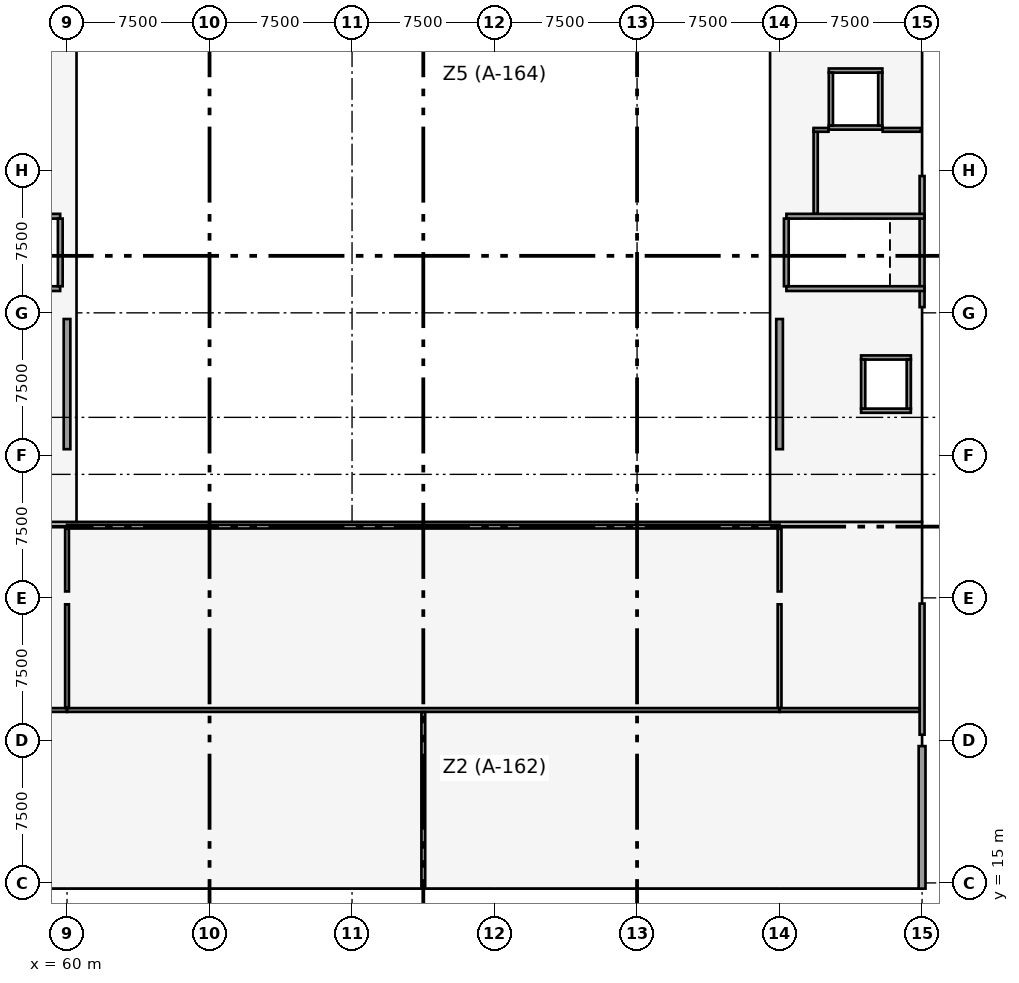
"""IFC4 building model, lengths in metres.
Left out: names, types, materials, properties, quantities, classifications, styles, units other than length and angle.
Written with IfcOpenShell. Run it as: python <this file> out.ifc"""

import sys

from ifc_helpers import new_model, si_unit, direction, frame, frame_2d, origin, origin_2d, place, context, subcontext, project, spatial, rectangle, extrude, element, fill, save


model = new_model("IFC4")
c1 = context("Model", 3, precision=1e-05, world=origin(), true_north=direction((0.0, 1.0)))
c2 = subcontext(c1, "Body", "Model", "MODEL_VIEW")
j1 = project(units=[si_unit("LENGTHUNIT", "METRE"), si_unit("PLANEANGLEUNIT", "RADIAN")], contexts=[c1])
p1 = place(None, origin())
s1 = spatial("IfcSite", under=j1, at=p1, CompositionType="ELEMENT")
p2 = place(p1, origin())
s2 = spatial("IfcBuilding", under=s1, at=p2, CompositionType="ELEMENT")
p3 = place(p2, frame((0.0, 0.0, 21.0)))
s3 = spatial("IfcBuildingStorey", under=s2, at=p3, CompositionType="ELEMENT", Elevation=21.0)
for number, where, z_axis, x_axis in (
    (1, (60.0, 22.5, 0.0), (0.0, 0.0, 1.0), (1.0, 0.0, 0.0)),
    (2, (60.0, 30.0, 0.0), (0.0, 0.0, 1.0), (1.0, 0.0, 0.0)),
    (3, (60.0, 37.5, 0.0), (0.0, 0.0, 1.0), (1.0, 0.0, 0.0)),
    (4, (60.0, 45.0, 0.0), (0.0, 0.0, 1.0), (1.0, 0.0, 0.0)),
    (5, (60.0, 52.5, 0.0), (0.0, 0.0, 1.0), (1.0, 0.0, 0.0)),
    (6, (75.0, 22.5, 0.0), (0.0, 0.0, 1.0), (1.0, 0.0, 0.0)),
    (7, (75.0, 30.0, 0.0), (0.0, 0.0, 1.0), (1.0, 0.0, 0.0)),
    (8, (90.0, 22.5, 0.0), (0.0, 0.0, 1.0), (1.0, 0.0, 0.0)),
    (9, (90.0, 30.0, 0.0), (0.0, 0.0, 1.0), (1.0, 0.0, 0.0)),
    (10, (97.5, 22.5, 0.0), (0.0, 0.0, 1.0), (1.0, 0.0, 0.0)),
    (11, (97.5, 30.0, 0.0), (0.0, 0.0, 1.0), (1.0, 0.0, 0.0)),
    (12, (97.5, 37.5, 0.0), (0.0, 0.0, 1.0), (1.0, 0.0, 0.0)),
    (13, (97.5, 45.0, 0.0), (0.0, 0.0, 1.0), (1.0, 0.0, 0.0)),
    (14, (97.5, 52.5, 0.0), (0.0, 0.0, 1.0), (1.0, 0.0, 0.0)),
):
    element("IfcColumn", number, at=place(p3, frame(where, z_axis=z_axis, x_axis=x_axis)), inside=s3, PredefinedType="COLUMN", context=c2, shape_type="SweptSolid", body=[
        extrude(rectangle(XDim=0.65, YDim=0.65, at=origin_2d()), origin(), (0.0, 0.0, 1.0), 4.2),
    ])
p4 = place(p3, frame((105.0, 22.5, 0.0), z_axis=(0.0, 0.0, 1.0), x_axis=(1.0, 0.0, 0.0)))
e15 = element("IfcColumn", 15, at=p4, inside=s3, PredefinedType="COLUMN", context=c2, shape_type="SweptSolid", body=[
    extrude(rectangle(XDim=0.6, YDim=1.1, at=origin_2d()), origin(), (0.0, 0.0, 1.0), 4.2),
])
for number, where, z_axis, x_axis in (
    (16, (105.0, 30.0, 0.0), (0.0, 0.0, 1.0), (1.0, 0.0, 0.0)),
    (17, (105.0, 37.5, 0.0), (0.0, 0.0, 1.0), (1.0, 0.0, 0.0)),
    (18, (105.0, 45.0, 0.0), (0.0, 0.0, 1.0), (1.0, 0.0, 0.0)),
    (19, (105.0, 52.5, 0.0), (0.0, 0.0, 1.0), (1.0, 0.0, 0.0)),
):
    element("IfcColumn", number, at=place(p3, frame(where, z_axis=z_axis, x_axis=x_axis)), inside=s3, PredefinedType="COLUMN", context=c2, shape_type="SweptSolid", body=[
        extrude(rectangle(XDim=0.65, YDim=0.65, at=origin_2d()), origin(), (0.0, 0.0, 1.0), 4.2),
    ])
for number, where, z_axis, x_axis in (
    (20, (60.0, 37.825, 0.0), (0.0, 0.0, 1.0), (0.0, 1.0, 0.0)),
    (21, (97.5, 37.825, 0.0), (0.0, 0.0, 1.0), (0.0, 1.0, 0.0)),
):
    element("IfcWall", number, at=place(p3, frame(where, z_axis=z_axis, x_axis=x_axis)), inside=s3, PredefinedType="SHEAR", context=c2, shape_type="SweptSolid", body=[
        extrude(rectangle(XDim=6.85, YDim=0.35, at=frame_2d((3.425, 0.0))), origin(), (0.0, 0.0, 1.0), 2.72),
    ])
p5 = place(p3, frame((105.0, 14.7, 0.0), z_axis=(0.0, 0.0, 1.0), x_axis=(0.0, 1.0, 0.0)))
e22 = element("IfcWall", 22, at=p5, inside=s3, PredefinedType="SOLIDWALL", context=c2, shape_type="SweptSolid", body=[
    extrude(rectangle(XDim=7.5, YDim=0.36, at=frame_2d((3.75, 0.0))), origin(), (0.0, 0.0, 1.0), 3.32),
])
p6 = place(p3, frame((105.0, 22.8, 0.0), z_axis=(0.0, 0.0, 1.0), x_axis=(0.0, 1.0, 0.0)))
e23 = element("IfcWall", 23, at=p6, inside=s3, PredefinedType="SOLIDWALL", context=c2, shape_type="SweptSolid", body=[
    extrude(rectangle(XDim=6.9, YDim=0.26, at=frame_2d((3.45, 0.0))), origin(), (0.0, 0.0, 1.0), 3.04),
])
p7 = place(p3, frame((105.0, 45.3, 0.0), z_axis=(0.0, 0.0, 1.0), x_axis=(0.0, 1.0, 0.0)))
e24 = element("IfcWall", 24, at=p7, inside=s3, PredefinedType="SOLIDWALL", context=c2, shape_type="SweptSolid", body=[
    extrude(rectangle(XDim=6.9, YDim=0.26, at=frame_2d((3.45, 0.0))), origin(), (0.0, 0.0, 1.0), 2.94),
])
p8 = place(p3, frame((52.38, 46.275, 0.0), z_axis=(0.0, 0.0, 1.0), x_axis=(1.0, 0.0, 0.0)))
e25 = element("IfcWall", 25, at=p8, inside=s3, PredefinedType="SOLIDWALL", context=c2, shape_type="SweptSolid", body=[
    extrude(rectangle(XDim=7.26, YDim=0.25, at=frame_2d((3.63, 0.0))), origin(), (0.0, 0.0, 1.0), 3.92),
])
p9 = place(p8, frame((0.62, 0.0, 0.0)))
e26 = element("IfcOpeningElement", 26, at=p9, cuts=e25, PredefinedType="OPENING", context=c2, shape_type="SweptSolid", body=[
    extrude(rectangle(XDim=1.1, YDim=2.15, at=frame_2d((0.55, 1.075))), frame((0.0, 0.135, 0.0), z_axis=(0.0, -1.0, 0.0), x_axis=(1.0, 0.0, 0.0)), (0.0, 0.0, 1.0), 0.27),
])
p10 = place(p3, frame((52.38, 50.085, 0.0), z_axis=(0.0, 0.0, 1.0), x_axis=(1.0, 0.0, 0.0)))
e27 = element("IfcWall", 27, at=p10, inside=s3, PredefinedType="SOLIDWALL", context=c2, shape_type="SweptSolid", body=[
    extrude(rectangle(XDim=7.26, YDim=0.25, at=frame_2d((3.63, 0.0))), origin(), (0.0, 0.0, 1.0), 3.92),
])
p11 = place(p10, frame((0.62, 0.0, 0.0)))
e28 = element("IfcOpeningElement", 28, at=p11, cuts=e27, PredefinedType="OPENING", context=c2, shape_type="SweptSolid", body=[
    extrude(rectangle(XDim=1.1, YDim=2.15, at=frame_2d((0.55, 1.075))), frame((0.0, 0.135, 0.0), z_axis=(0.0, -1.0, 0.0), x_axis=(1.0, 0.0, 0.0)), (0.0, 0.0, 1.0), 0.27),
])
p12 = place(p3, frame((59.645, 46.4, 0.0), z_axis=(0.0, 0.0, 1.0), x_axis=(0.0, 1.0, 0.0)))
e29 = element("IfcWall", 29, at=p12, inside=s3, PredefinedType="SOLIDWALL", context=c2, shape_type="SweptSolid", body=[
    extrude(rectangle(XDim=3.56, YDim=0.25, at=frame_2d((1.78, 0.0))), origin(), (0.0, 0.0, 1.0), 3.92),
])
p13 = place(p3, frame((97.86, 46.275, 0.0), z_axis=(0.0, 0.0, 1.0), x_axis=(1.0, 0.0, 0.0)))
e30 = element("IfcWall", 30, at=p13, inside=s3, PredefinedType="SOLIDWALL", context=c2, shape_type="SweptSolid", body=[
    extrude(rectangle(XDim=7.26, YDim=0.25, at=frame_2d((3.63, 0.0))), origin(), (0.0, 0.0, 1.0), 3.92),
])
p14 = place(p13, frame((5.54, 0.0, 0.0)))
e31 = element("IfcOpeningElement", 31, at=p14, cuts=e30, PredefinedType="OPENING", context=c2, shape_type="SweptSolid", body=[
    extrude(rectangle(XDim=1.1, YDim=2.15, at=frame_2d((0.55, 1.075))), frame((0.0, 0.135, 0.0), z_axis=(0.0, -1.0, 0.0), x_axis=(1.0, 0.0, 0.0)), (0.0, 0.0, 1.0), 0.27),
])
p15 = place(p3, frame((97.86, 50.085, 0.0), z_axis=(0.0, 0.0, 1.0), x_axis=(1.0, 0.0, 0.0)))
e32 = element("IfcWall", 32, at=p15, inside=s3, PredefinedType="SOLIDWALL", context=c2, shape_type="SweptSolid", body=[
    extrude(rectangle(XDim=7.26, YDim=0.25, at=frame_2d((3.63, 0.0))), origin(), (0.0, 0.0, 1.0), 3.92),
])
p16 = place(p15, frame((5.54, 0.0, 0.0)))
e33 = element("IfcOpeningElement", 33, at=p16, cuts=e32, PredefinedType="OPENING", context=c2, shape_type="SweptSolid", body=[
    extrude(rectangle(XDim=1.1, YDim=2.15, at=frame_2d((0.55, 1.075))), frame((0.0, 0.135, 0.0), z_axis=(0.0, -1.0, 0.0), x_axis=(1.0, 0.0, 0.0)), (0.0, 0.0, 1.0), 0.27),
])
p17 = place(p3, frame((97.855, 46.4, 0.0), z_axis=(0.0, 0.0, 1.0), x_axis=(0.0, 1.0, 0.0)))
e34 = element("IfcWall", 34, at=p17, inside=s3, PredefinedType="SOLIDWALL", context=c2, shape_type="SweptSolid", body=[
    extrude(rectangle(XDim=3.56, YDim=0.25, at=frame_2d((1.78, 0.0))), origin(), (0.0, 0.0, 1.0), 3.92),
])
for number, where, z_axis, x_axis in (
    (35, (101.79, 39.85, 0.0), (0.0, 0.0, 1.0), (1.0, 0.0, 0.0)),
    (36, (101.79, 42.65, 0.0), (0.0, 0.0, 1.0), (1.0, 0.0, 0.0)),
):
    element("IfcWall", number, at=place(p3, frame(where, z_axis=z_axis, x_axis=x_axis)), inside=s3, PredefinedType="SOLIDWALL", context=c2, shape_type="SweptSolid", body=[
        extrude(rectangle(XDim=2.62, YDim=0.22, at=frame_2d((1.31, 0.0))), origin(), (0.0, 0.0, 1.0), 3.92),
    ])
p18 = place(p3, frame((101.9, 39.96, 0.0), z_axis=(0.0, 0.0, 1.0), x_axis=(0.0, 1.0, 0.0)))
e37 = element("IfcWall", 37, at=p18, inside=s3, PredefinedType="SOLIDWALL", context=c2, shape_type="SweptSolid", body=[
    extrude(rectangle(XDim=2.58, YDim=0.22, at=frame_2d((1.29, 0.0))), origin(), (0.0, 0.0, 1.0), 3.92),
])
p19 = place(p18, frame((0.79, 0.0, 0.0)))
e38 = element("IfcOpeningElement", 38, at=p19, cuts=e37, PredefinedType="OPENING", context=c2, shape_type="SweptSolid", body=[
    extrude(rectangle(XDim=1.0, YDim=2.15, at=frame_2d((0.5, 1.075))), frame((0.0, 0.12, 0.0), z_axis=(0.0, -1.0, 0.0), x_axis=(1.0, 0.0, 0.0)), (0.0, 0.0, 1.0), 0.24),
])
p20 = place(p3, frame((104.3, 39.96, 0.0), z_axis=(0.0, 0.0, 1.0), x_axis=(0.0, 1.0, 0.0)))
e39 = element("IfcWall", 39, at=p20, inside=s3, PredefinedType="SOLIDWALL", context=c2, shape_type="SweptSolid", body=[
    extrude(rectangle(XDim=2.58, YDim=0.22, at=frame_2d((1.29, 0.0))), origin(), (0.0, 0.0, 1.0), 3.92),
])
p21 = place(p3, frame((100.09, 54.75, 0.0), z_axis=(0.0, 0.0, 1.0), x_axis=(1.0, 0.0, 0.0)))
e40 = element("IfcWall", 40, at=p21, inside=s3, PredefinedType="SOLIDWALL", context=c2, shape_type="SweptSolid", body=[
    extrude(rectangle(XDim=2.82, YDim=0.22, at=frame_2d((1.41, 0.0))), origin(), (0.0, 0.0, 1.0), 3.92),
])
p22 = place(p21, frame((0.86, 0.0, 0.0)))
e41 = element("IfcOpeningElement", 41, at=p22, cuts=e40, PredefinedType="OPENING", context=c2, shape_type="SweptSolid", body=[
    extrude(rectangle(XDim=1.1, YDim=2.15, at=frame_2d((0.55, 1.075))), frame((0.0, 0.12, 0.0), z_axis=(0.0, -1.0, 0.0), x_axis=(1.0, 0.0, 0.0)), (0.0, 0.0, 1.0), 0.24),
])
p23 = place(p3, frame((100.09, 57.75, 0.0), z_axis=(0.0, 0.0, 1.0), x_axis=(1.0, 0.0, 0.0)))
e42 = element("IfcWall", 42, at=p23, inside=s3, PredefinedType="SOLIDWALL", context=c2, shape_type="SweptSolid", body=[
    extrude(rectangle(XDim=2.82, YDim=0.22, at=frame_2d((1.41, 0.0))), origin(), (0.0, 0.0, 1.0), 3.92),
])
for number, where, z_axis, x_axis in (
    (43, (100.2, 54.86, 0.0), (0.0, 0.0, 1.0), (0.0, 1.0, 0.0)),
    (44, (102.8, 54.86, 0.0), (0.0, 0.0, 1.0), (0.0, 1.0, 0.0)),
):
    element("IfcWall", number, at=place(p3, frame(where, z_axis=z_axis, x_axis=x_axis)), inside=s3, PredefinedType="SOLIDWALL", context=c2, shape_type="SweptSolid", body=[
        extrude(rectangle(XDim=2.78, YDim=0.22, at=frame_2d((1.39, 0.0))), origin(), (0.0, 0.0, 1.0), 3.92),
    ])
p24 = place(p3, frame((99.4, 50.22, 0.0), z_axis=(0.0, 0.0, 1.0), x_axis=(0.0, 1.0, 0.0)))
e45 = element("IfcWall", 45, at=p24, inside=s3, PredefinedType="SOLIDWALL", context=c2, shape_type="SweptSolid", body=[
    extrude(rectangle(XDim=4.41, YDim=0.22, at=frame_2d((2.205, 0.0))), origin(), (0.0, 0.0, 1.0), 3.92),
])
p25 = place(p24, frame((0.45, 0.0, 0.0)))
e46 = element("IfcOpeningElement", 46, at=p25, cuts=e45, PredefinedType="OPENING", context=c2, shape_type="SweptSolid", body=[
    extrude(rectangle(XDim=1.1, YDim=2.15, at=frame_2d((0.55, 1.075))), frame((0.0, 0.12, 0.0), z_axis=(0.0, -1.0, 0.0), x_axis=(1.0, 0.0, 0.0)), (0.0, 0.0, 1.0), 0.24),
])
p26 = place(p3, frame((99.29, 54.63, 0.0), z_axis=(0.0, 0.0, 1.0), x_axis=(1.0, 0.0, 0.0)))
e47 = element("IfcWall", 47, at=p26, inside=s3, PredefinedType="PARTITIONING", context=c2, shape_type="SweptSolid", body=[
    extrude(rectangle(XDim=0.785, YDim=0.2, at=frame_2d((0.393, 0.0))), origin(), (0.0, 0.0, 1.0), 3.9),
])
p27 = place(p3, frame((102.925, 54.63, 0.0), z_axis=(0.0, 0.0, 1.0), x_axis=(1.0, 0.0, 0.0)))
e48 = element("IfcWall", 48, at=p27, inside=s3, PredefinedType="PARTITIONING", context=c2, shape_type="SweptSolid", body=[
    extrude(rectangle(XDim=2.015, YDim=0.2, at=frame_2d((1.007, 0.0))), origin(), (0.0, 0.0, 1.0), 3.48),
])
p28 = place(p3, frame((52.644, 24.1, 0.0), z_axis=(0.0, 0.0, 1.0), x_axis=(1.0, 0.0, 0.0)))
e49 = element("IfcWall", 49, at=p28, inside=s3, PredefinedType="PARTITIONING", context=c2, shape_type="SweptSolid", body=[
    extrude(rectangle(XDim=7.356, YDim=0.2, at=frame_2d((3.678, 0.0))), origin(), (0.0, 0.0, 1.0), 2.69),
])
p29 = place(p28, frame((3.006, 0.0, 0.0)))
e50 = element("IfcOpeningElement", 50, at=p29, cuts=e49, PredefinedType="OPENING", context=c2, shape_type="SweptSolid", body=[
    extrude(rectangle(XDim=1.2, YDim=2.15, at=frame_2d((0.6, 1.075))), frame((0.0, 0.11, 0.0), z_axis=(0.0, -1.0, 0.0), x_axis=(1.0, 0.0, 0.0)), (0.0, 0.0, 1.0), 0.22),
])
p30 = place(p3, frame((97.5, 24.1, 0.0), z_axis=(0.0, 0.0, 1.0), x_axis=(1.0, 0.0, 0.0)))
e51 = element("IfcWall", 51, at=p30, inside=s3, PredefinedType="PARTITIONING", context=c2, shape_type="SweptSolid", body=[
    extrude(rectangle(XDim=7.356, YDim=0.2, at=frame_2d((3.678, 0.0))), origin(), (0.0, 0.0, 1.0), 2.69),
])
p31 = place(p30, frame((3.15, 0.0, 0.0)))
e52 = element("IfcOpeningElement", 52, at=p31, cuts=e51, PredefinedType="OPENING", context=c2, shape_type="SweptSolid", body=[
    extrude(rectangle(XDim=1.2, YDim=2.15, at=frame_2d((0.6, 1.075))), frame((0.0, 0.11, 0.0), z_axis=(0.0, -1.0, 0.0), x_axis=(1.0, 0.0, 0.0)), (0.0, 0.0, 1.0), 0.22),
])
for number, where, z_axis, x_axis in (
    (53, (60.0, 24.1, 0.0), (0.0, 0.0, 1.0), (1.0, 0.0, 0.0)),
    (54, (60.0, 33.75, 0.0), (0.0, 0.0, 1.0), (1.0, 0.0, 0.0)),
):
    element("IfcWall", number, at=place(p3, frame(where, z_axis=z_axis, x_axis=x_axis)), inside=s3, PredefinedType="PARTITIONING", context=c2, shape_type="SweptSolid", body=[
        extrude(rectangle(XDim=37.5, YDim=0.2, at=frame_2d((18.75, 0.0))), origin(), (0.0, 0.0, 1.0), 2.69),
    ])
p32 = place(p3, frame((78.75, 14.82, 0.0), z_axis=(0.0, 0.0, 1.0), x_axis=(0.0, 1.0, 0.0)))
e55 = element("IfcWall", 55, at=p32, inside=s3, PredefinedType="PARTITIONING", context=c2, shape_type="SweptSolid", body=[
    extrude(rectangle(XDim=9.166, YDim=0.2, at=frame_2d((4.583, 0.0))), origin(), (0.0, 0.0, 1.0), 2.99),
])
p33 = place(p32, frame((3.73, 0.0, 0.0)))
e56 = element("IfcOpeningElement", 56, at=p33, cuts=e55, PredefinedType="OPENING", context=c2, shape_type="SweptSolid", body=[
    extrude(rectangle(XDim=1.3, YDim=2.15, at=frame_2d((0.65, 1.075))), frame((0.0, 0.11, 0.0), z_axis=(0.0, -1.0, 0.0), x_axis=(1.0, 0.0, 0.0)), (0.0, 0.0, 1.0), 0.22),
])
p34 = place(p3, frame((60.0, 24.214, 0.0), z_axis=(0.0, 0.0, 1.0), x_axis=(0.0, 1.0, 0.0)))
e57 = element("IfcWall", 57, at=p34, inside=s3, PredefinedType="PARTITIONING", context=c2, shape_type="SweptSolid", body=[
    extrude(rectangle(XDim=5.447, YDim=0.2, at=frame_2d((2.723, 0.0))), origin(), (0.0, 0.0, 1.0), 2.69),
])
p35 = place(p34, frame((2.186, 0.0, 0.0)))
e58 = element("IfcOpeningElement", 58, at=p35, cuts=e57, PredefinedType="OPENING", context=c2, shape_type="SweptSolid", body=[
    extrude(rectangle(XDim=1.2, YDim=2.15, at=frame_2d((0.6, 1.075))), frame((0.0, 0.11, 0.0), z_axis=(0.0, -1.0, 0.0), x_axis=(1.0, 0.0, 0.0)), (0.0, 0.0, 1.0), 0.22),
])
p36 = place(p3, frame((60.0, 30.339, 0.0), z_axis=(0.0, 0.0, 1.0), x_axis=(0.0, 1.0, 0.0)))
e59 = element("IfcWall", 59, at=p36, inside=s3, PredefinedType="PARTITIONING", context=c2, shape_type="SweptSolid", body=[
    extrude(rectangle(XDim=3.297, YDim=0.2, at=frame_2d((1.648, 0.0))), origin(), (0.0, 0.0, 1.0), 2.69),
])
p37 = place(p3, frame((97.5, 24.214, 0.0), z_axis=(0.0, 0.0, 1.0), x_axis=(0.0, 1.0, 0.0)))
e60 = element("IfcWall", 60, at=p37, inside=s3, PredefinedType="PARTITIONING", context=c2, shape_type="SweptSolid", body=[
    extrude(rectangle(XDim=5.447, YDim=0.2, at=frame_2d((2.723, 0.0))), origin(), (0.0, 0.0, 1.0), 2.69),
])
p38 = place(p37, frame((2.186, 0.0, 0.0)))
e61 = element("IfcOpeningElement", 61, at=p38, cuts=e60, PredefinedType="OPENING", context=c2, shape_type="SweptSolid", body=[
    extrude(rectangle(XDim=1.2, YDim=2.15, at=frame_2d((0.6, 1.075))), frame((0.0, 0.11, 0.0), z_axis=(0.0, -1.0, 0.0), x_axis=(1.0, 0.0, 0.0)), (0.0, 0.0, 1.0), 0.22),
])
p39 = place(p3, frame((97.5, 30.339, 0.0), z_axis=(0.0, 0.0, 1.0), x_axis=(0.0, 1.0, 0.0)))
e62 = element("IfcWall", 62, at=p39, inside=s3, PredefinedType="PARTITIONING", context=c2, shape_type="SweptSolid", body=[
    extrude(rectangle(XDim=3.297, YDim=0.2, at=frame_2d((1.648, 0.0))), origin(), (0.0, 0.0, 1.0), 2.69),
])
p40 = place(p14, origin())
e63 = element("IfcDoor", 63, at=p40, inside=s3, OperationType="SINGLE_SWING_LEFT", PredefinedType="DOOR", context=c2, shape_type="SweptSolid", body=[
    extrude(rectangle(XDim=1.1, YDim=2.15, at=frame_2d((0.55, 1.075))), frame((0.0, 0.025, 0.0), z_axis=(0.0, -1.0, 0.0), x_axis=(1.0, 0.0, 0.0)), (0.0, 0.0, 1.0), 0.05),
])
fill(e31, e63)
p41 = place(p16, frame((1.1, 0.0, 0.0), z_axis=(0.0, 0.0, 1.0), x_axis=(-1.0, 0.0, 0.0)))
e64 = element("IfcDoor", 64, at=p41, inside=s3, OperationType="SINGLE_SWING_RIGHT", PredefinedType="DOOR", context=c2, shape_type="SweptSolid", body=[
    extrude(rectangle(XDim=1.1, YDim=2.15, at=frame_2d((0.55, 1.075))), frame((0.0, 0.025, 0.0), z_axis=(0.0, -1.0, 0.0), x_axis=(1.0, 0.0, 0.0)), (0.0, 0.0, 1.0), 0.05),
])
fill(e33, e64)
p42 = place(p19, origin())
e65 = element("IfcDoor", 65, at=p42, inside=s3, OperationType="SLIDING_TO_LEFT", PredefinedType="DOOR", context=c2, shape_type="SweptSolid", body=[
    extrude(rectangle(XDim=1.0, YDim=2.15, at=frame_2d((0.5, 1.075))), frame((0.0, 0.025, 0.0), z_axis=(0.0, -1.0, 0.0), x_axis=(1.0, 0.0, 0.0)), (0.0, 0.0, 1.0), 0.05),
])
fill(e38, e65)
p43 = place(p22, origin())
e66 = element("IfcDoor", 66, at=p43, inside=s3, OperationType="SLIDING_TO_LEFT", PredefinedType="DOOR", context=c2, shape_type="SweptSolid", body=[
    extrude(rectangle(XDim=1.1, YDim=2.15, at=frame_2d((0.55, 1.075))), frame((0.0, 0.025, 0.0), z_axis=(0.0, -1.0, 0.0), x_axis=(1.0, 0.0, 0.0)), (0.0, 0.0, 1.0), 0.05),
])
fill(e41, e66)
p44 = place(p25, origin())
e67 = element("IfcDoor", 67, at=p44, inside=s3, OperationType="SINGLE_SWING_RIGHT", PredefinedType="DOOR", context=c2, shape_type="SweptSolid", body=[
    extrude(rectangle(XDim=1.1, YDim=2.15, at=frame_2d((0.55, 1.075))), frame((0.0, 0.025, 0.0), z_axis=(0.0, -1.0, 0.0), x_axis=(1.0, 0.0, 0.0)), (0.0, 0.0, 1.0), 0.05),
])
fill(e46, e67)
p45 = place(p31, origin())
e68 = element("IfcDoor", 68, at=p45, inside=s3, OperationType="SINGLE_SWING_RIGHT", PredefinedType="DOOR", context=c2, shape_type="SweptSolid", body=[
    extrude(rectangle(XDim=1.2, YDim=2.15, at=frame_2d((0.6, 1.075))), frame((0.0, 0.025, 0.0), z_axis=(0.0, -1.0, 0.0), x_axis=(1.0, 0.0, 0.0)), (0.0, 0.0, 1.0), 0.05),
])
fill(e52, e68)
p46 = place(p33, origin())
e69 = element("IfcDoor", 69, at=p46, inside=s3, OperationType="SINGLE_SWING_LEFT", PredefinedType="DOOR", context=c2, shape_type="SweptSolid", body=[
    extrude(rectangle(XDim=1.3, YDim=2.15, at=frame_2d((0.65, 1.075))), frame((0.0, 0.025, 0.0), z_axis=(0.0, -1.0, 0.0), x_axis=(1.0, 0.0, 0.0)), (0.0, 0.0, 1.0), 0.05),
])
fill(e56, e69)
p47 = place(p35, origin())
e70 = element("IfcDoor", 70, at=p47, inside=s3, OperationType="SINGLE_SWING_RIGHT", PredefinedType="DOOR", context=c2, shape_type="SweptSolid", body=[
    extrude(rectangle(XDim=1.2, YDim=2.15, at=frame_2d((0.6, 1.075))), frame((0.0, 0.025, 0.0), z_axis=(0.0, -1.0, 0.0), x_axis=(1.0, 0.0, 0.0)), (0.0, 0.0, 1.0), 0.05),
])
fill(e58, e70)
p48 = place(p38, origin())
e71 = element("IfcDoor", 71, at=p48, inside=s3, OperationType="SINGLE_SWING_LEFT", PredefinedType="DOOR", context=c2, shape_type="SweptSolid", body=[
    extrude(rectangle(XDim=1.2, YDim=2.15, at=frame_2d((0.6, 1.075))), frame((0.0, 0.025, 0.0), z_axis=(0.0, -1.0, 0.0), x_axis=(1.0, 0.0, 0.0)), (0.0, 0.0, 1.0), 0.05),
])
fill(e61, e71)
save(model, sys.argv[1])
